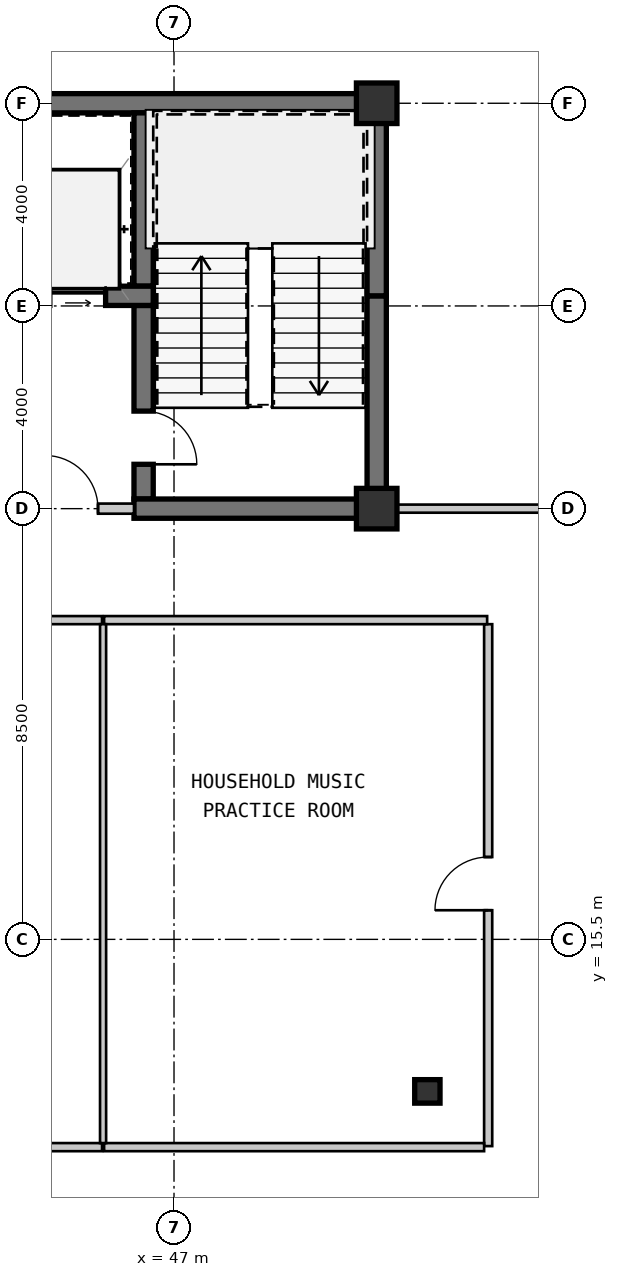
"""IFC4 building model, lengths in metres.
Left out: names, types, materials, properties, quantities, classifications, styles, units other than length and angle.
Written with IfcOpenShell. Run it as: python <this file> out.ifc"""

import sys

from ifc_helpers import new_model, si_unit, direction, frame, frame_2d, origin, origin_2d, place, context, subcontext, project, spatial, rectangle, i_section, extrude, source, transform, mapped, element, fill, save


model = new_model("IFC4")
c1 = context("Model", 3, precision=1e-05, world=origin(), true_north=direction((0.0, 1.0)))
c2 = subcontext(c1, "Body", "Model", "MODEL_VIEW")
j1 = project(units=[si_unit("LENGTHUNIT", "METRE"), si_unit("PLANEANGLEUNIT", "RADIAN")], contexts=[c1])
p1 = place(None, origin())
s1 = spatial("IfcSite", under=j1, at=p1, CompositionType="ELEMENT")
p2 = place(p1, origin())
s2 = spatial("IfcBuilding", under=s1, at=p2, CompositionType="ELEMENT")
p3 = place(p2, frame((0.0, 0.0, 51.45)))
s3 = spatial("IfcBuildingStorey", under=s2, at=p3, CompositionType="ELEMENT", Elevation=51.45)
m1 = source(origin(), c2, "Body", "SweptSolid", [
    extrude(rectangle(XDim=0.8, YDim=0.8, at=origin_2d()), origin(), (0.0, 0.0, 1.0), 3.15),
])
for number, where, z_axis, x_axis in (
    (1, (51.0, 24.0, 0.0), (0.0, 0.0, 1.0), (1.0, 0.0, 0.0)),
    (2, (51.0, 32.0, 0.0), (0.0, 0.0, 1.0), (1.0, 0.0, 0.0)),
):
    element("IfcColumn", number, at=place(p3, frame(where, z_axis=z_axis, x_axis=x_axis)), inside=s3, PredefinedType="COLUMN", context=c2, shape_type="MappedRepresentation", body=[
        mapped(m1, transform((0.0, 0.0, 0.0), scale=1.0)),
    ])
m2 = source(origin(), c2, "Body", "SweptSolid", [
    extrude(i_section(OverallWidth=0.5, OverallDepth=0.464, WebThickness=0.022, FlangeThickness=0.034, at=origin_2d()), origin(), (0.0, 0.0, 1.0), 3.15),
])
p4 = place(p3, frame((52.0, 12.5, 0.0), z_axis=(0.0, 0.0, 1.0), x_axis=(1.0, 0.0, 0.0)))
e3 = element("IfcColumn", 3, at=p4, inside=s3, PredefinedType="COLUMN", context=c2, shape_type="MappedRepresentation", body=[
    mapped(m2, transform((0.0, 0.0, 0.0), scale=1.0)),
])
m3 = source(origin(), c2, "Body", "SweptSolid", [
    extrude(rectangle(XDim=11.99, YDim=0.38, at=frame_2d((5.995, 0.0))), origin(), (0.0, 0.0, 1.0), 2.93),
])
p5 = place(p3, frame((39.2, 32.0, 0.0), z_axis=(0.0, 0.0, 1.0), x_axis=(1.0, 0.0, 0.0)))
e4 = element("IfcWall", 4, at=p5, inside=s3, PredefinedType="SHEAR", context=c2, shape_type="MappedRepresentation", body=[
    mapped(m3, transform((0.0, 0.0, 0.0), scale=1.0)),
])
m4 = source(origin(), c2, "Body", "SweptSolid", [
    extrude(rectangle(XDim=4.01, YDim=0.38, at=frame_2d((2.005, 0.0))), origin(), (0.0, 0.0, 1.0), 2.93),
])
p6 = place(p3, frame((51.0, 24.19, 0.0), z_axis=(0.0, 0.0, 1.0), x_axis=(0.0, 1.0, 0.0)))
e5 = element("IfcWall", 5, at=p6, inside=s3, PredefinedType="SHEAR", context=c2, shape_type="MappedRepresentation", body=[
    mapped(m4, transform((0.0, 0.0, 0.0), scale=1.0)),
])
m5 = source(origin(), c2, "Body", "SweptSolid", [
    extrude(rectangle(XDim=3.61, YDim=0.38, at=frame_2d((1.805, 0.0))), origin(), (0.0, 0.0, 1.0), 2.93),
])
p7 = place(p3, frame((51.0, 28.2, 0.0), z_axis=(0.0, 0.0, 1.0), x_axis=(0.0, 1.0, 0.0)))
e6 = element("IfcWall", 6, at=p7, inside=s3, PredefinedType="SHEAR", context=c2, shape_type="MappedRepresentation", body=[
    mapped(m5, transform((0.0, 0.0, 0.0), scale=1.0)),
])
m6 = source(origin(), c2, "Body", "SweptSolid", [
    extrude(rectangle(XDim=3.42, YDim=0.38, at=frame_2d((1.71, 0.0))), origin(), (0.0, 0.0, 1.0), 2.93),
])
p8 = place(p3, frame((46.4, 31.81, 0.0), z_axis=(0.0, 0.0, 1.0), x_axis=(0.0, -1.0, 0.0)))
e7 = element("IfcWall", 7, at=p8, inside=s3, PredefinedType="SHEAR", context=c2, shape_type="MappedRepresentation", body=[
    mapped(m6, transform((0.0, 0.0, 0.0), scale=1.0)),
])
m7 = source(origin(), c2, "Body", "SweptSolid", [
    extrude(rectangle(XDim=3.82, YDim=0.38, at=frame_2d((1.91, 0.0))), origin(), (0.0, 0.0, 1.0), 2.93),
])
p9 = place(p3, frame((46.4, 28.01, 0.0), z_axis=(0.0, 0.0, 1.0), x_axis=(0.0, -1.0, 0.0)))
e8 = element("IfcWall", 8, at=p9, inside=s3, PredefinedType="SHEAR", context=c2, shape_type="MappedRepresentation", body=[
    mapped(m7, transform((0.0, 0.0, 0.0), scale=1.0)),
])
m8 = source(origin(), c2, "Body", "SweptSolid", [
    extrude(rectangle(XDim=1.05, YDim=2.1, at=frame_2d((0.525, 1.05))), frame((0.0, 0.2, 0.0), z_axis=(0.0, -1.0, 0.0), x_axis=(1.0, 0.0, 0.0)), (0.0, 0.0, 1.0), 0.4),
])
p10 = place(p9, frame((2.085, 0.0, 0.0)))
e9 = element("IfcOpeningElement", 9, at=p10, cuts=e8, PredefinedType="OPENING", context=c2, shape_type="MappedRepresentation", body=[
    mapped(m8, transform((0.0, 0.0, 0.0), scale=1.0)),
])
m9 = source(origin(), c2, "Body", "SweptSolid", [
    extrude(rectangle(XDim=4.98, YDim=0.38, at=frame_2d((2.49, 0.0))), origin(), (0.0, 0.0, 1.0), 2.93),
])
p11 = place(p3, frame((46.21, 24.0, 0.0), z_axis=(0.0, 0.0, 1.0), x_axis=(1.0, 0.0, 0.0)))
e10 = element("IfcWall", 10, at=p11, inside=s3, PredefinedType="SHEAR", context=c2, shape_type="MappedRepresentation", body=[
    mapped(m9, transform((0.0, 0.0, 0.0), scale=1.0)),
])
m10 = source(origin(), c2, "Body", "SweptSolid", [
    extrude(rectangle(XDim=2.98, YDim=0.38, at=frame_2d((1.49, 0.0))), origin(), (0.0, 0.0, 1.0), 2.93),
])
p12 = place(p3, frame((43.61, 28.2, 0.0), z_axis=(0.0, 0.0, 1.0), x_axis=(1.0, 0.0, 0.0)))
e11 = element("IfcWall", 11, at=p12, inside=s3, PredefinedType="SHEAR", context=c2, shape_type="MappedRepresentation", body=[
    mapped(m10, transform((0.0, 0.0, 0.0), scale=1.0)),
])
m11 = source(origin(), c2, "Body", "SweptSolid", [
    extrude(rectangle(XDim=1.1, YDim=2.15, at=frame_2d((0.55, 1.075))), frame((0.0, 0.2, 0.0), z_axis=(0.0, -1.0, 0.0), x_axis=(1.0, 0.0, 0.0)), (0.0, 0.0, 1.0), 0.4),
])
p13 = place(p12, frame((0.94, 0.0, 0.0)))
e12 = element("IfcOpeningElement", 12, at=p13, cuts=e11, PredefinedType="OPENING", context=c2, shape_type="MappedRepresentation", body=[
    mapped(m11, transform((0.0, 0.0, 0.0), scale=1.0)),
])
m12 = source(origin(), c2, "Body", "SweptSolid", [
    extrude(rectangle(XDim=2.66, YDim=0.2, at=frame_2d((1.33, 0.0))), origin(), (0.0, 0.0, 1.0), 2.397),
])
p14 = place(p3, frame((43.55, 24.0, 0.0), z_axis=(0.0, 0.0, 1.0), x_axis=(1.0, 0.0, 0.0)))
e13 = element("IfcWall", 13, at=p14, inside=s3, PredefinedType="SOLIDWALL", context=c2, shape_type="MappedRepresentation", body=[
    mapped(m12, transform((0.0, 0.0, 0.0), scale=1.0)),
])
m13 = source(origin(), c2, "Body", "SweptSolid", [
    extrude(rectangle(XDim=1.05, YDim=2.1, at=frame_2d((0.525, 1.05))), frame((0.0, 0.11, 0.0), z_axis=(0.0, -1.0, 0.0), x_axis=(1.0, 0.0, 0.0)), (0.0, 0.0, 1.0), 0.22),
])
p15 = place(p14, frame((0.9, 0.0, 0.0)))
e14 = element("IfcOpeningElement", 14, at=p15, cuts=e13, PredefinedType="OPENING", context=c2, shape_type="MappedRepresentation", body=[
    mapped(m13, transform((0.0, 0.0, 0.0), scale=1.0)),
])
m14 = source(origin(), c2, "Body", "SweptSolid", [
    extrude(rectangle(XDim=7.56, YDim=0.16, at=frame_2d((3.78, 0.0))), origin(), (0.0, 0.0, 1.0), 2.93),
])
p16 = place(p3, frame((45.58, 21.8, 0.0), z_axis=(0.0, 0.0, 1.0), x_axis=(-1.0, 0.0, 0.0)))
e15 = element("IfcWall", 15, at=p16, inside=s3, PredefinedType="PARTITIONING", context=c2, shape_type="MappedRepresentation", body=[
    mapped(m14, transform((0.0, 0.0, 0.0), scale=1.0)),
])
m15 = source(origin(), c2, "Body", "SweptSolid", [
    extrude(rectangle(XDim=1.05, YDim=2.1, at=frame_2d((0.525, 1.05))), frame((0.0, 0.09, 0.0), z_axis=(0.0, -1.0, 0.0), x_axis=(1.0, 0.0, 0.0)), (0.0, 0.0, 1.0), 0.18),
])
p17 = place(p16, frame((3.255, 0.0, 0.0)))
e16 = element("IfcOpeningElement", 16, at=p17, cuts=e15, PredefinedType="OPENING", context=c2, shape_type="MappedRepresentation", body=[
    mapped(m15, transform((0.0, 0.0, 0.0), scale=1.0)),
])
m16 = source(origin(), c2, "Body", "SweptSolid", [
    extrude(rectangle(XDim=10.3, YDim=0.16, at=frame_2d((5.15, 0.0))), origin(), (0.0, 0.0, 1.0), 2.93),
])
p18 = place(p3, frame((53.2, 11.42, 0.0), z_axis=(0.0, 0.0, 1.0), x_axis=(0.0, 1.0, 0.0)))
e17 = element("IfcWall", 17, at=p18, inside=s3, PredefinedType="PARTITIONING", context=c2, shape_type="MappedRepresentation", body=[
    mapped(m16, transform((0.0, 0.0, 0.0), scale=1.0)),
])
p19 = place(p18, frame((4.655, 0.0, 0.0)))
e18 = element("IfcOpeningElement", 18, at=p19, cuts=e17, PredefinedType="OPENING", context=c2, shape_type="MappedRepresentation", body=[
    mapped(m15, transform((0.0, 0.0, 0.0), scale=1.0)),
])
p20 = place(p3, frame((53.18, 21.8, 0.0), z_axis=(0.0, 0.0, 1.0), x_axis=(-1.0, 0.0, 0.0)))
e19 = element("IfcWall", 19, at=p20, inside=s3, PredefinedType="PARTITIONING", context=c2, shape_type="MappedRepresentation", body=[
    mapped(m14, transform((0.0, 0.0, 0.0), scale=1.0)),
])
m17 = source(origin(), c2, "Body", "SweptSolid", [
    extrude(rectangle(XDim=4.13, YDim=0.16, at=frame_2d((2.065, 0.0))), origin(), (0.0, 0.0, 1.0), 2.93),
])
p21 = place(p3, frame((51.19, 24.0, 0.0), z_axis=(0.0, 0.0, 1.0), x_axis=(1.0, 0.0, 0.0)))
e20 = element("IfcWall", 20, at=p21, inside=s3, PredefinedType="PARTITIONING", context=c2, shape_type="MappedRepresentation", body=[
    mapped(m17, transform((0.0, 0.0, 0.0), scale=1.0)),
])
p22 = place(p3, frame((38.02, 11.4, 0.0), z_axis=(0.0, 0.0, 1.0), x_axis=(1.0, 0.0, 0.0)))
e21 = element("IfcWall", 21, at=p22, inside=s3, PredefinedType="PARTITIONING", context=c2, shape_type="MappedRepresentation", body=[
    mapped(m14, transform((0.0, 0.0, 0.0), scale=1.0)),
])
m18 = source(origin(), c2, "Body", "SweptSolid", [
    extrude(rectangle(XDim=7.5, YDim=0.16, at=frame_2d((3.75, 0.0))), origin(), (0.0, 0.0, 1.0), 2.93),
])
p23 = place(p3, frame((45.62, 11.4, 0.0), z_axis=(0.0, 0.0, 1.0), x_axis=(1.0, 0.0, 0.0)))
e22 = element("IfcWall", 22, at=p23, inside=s3, PredefinedType="PARTITIONING", context=c2, shape_type="MappedRepresentation", body=[
    mapped(m18, transform((0.0, 0.0, 0.0), scale=1.0)),
])
m19 = source(origin(), c2, "Body", "SweptSolid", [
    extrude(rectangle(XDim=10.24, YDim=0.12, at=frame_2d((5.12, 0.0))), origin(), (0.0, 0.0, 1.0), 2.93),
])
p24 = place(p3, frame((45.6, 21.72, 0.0), z_axis=(0.0, 0.0, 1.0), x_axis=(0.0, -1.0, 0.0)))
e23 = element("IfcWall", 23, at=p24, inside=s3, PredefinedType="PARTITIONING", context=c2, shape_type="MappedRepresentation", body=[
    mapped(m19, transform((0.0, 0.0, 0.0), scale=1.0)),
])
m20 = source(origin(), c2, "Body", "SweptSolid", [
    extrude(rectangle(XDim=1.05, YDim=2.1, at=frame_2d((0.525, 1.05))), frame((0.0, 0.025, 0.0), z_axis=(0.0, -1.0, 0.0), x_axis=(1.0, 0.0, 0.0)), (0.0, 0.0, 1.0), 0.05),
])
p25 = place(p10, origin())
e24 = element("IfcDoor", 24, at=p25, inside=s3, OperationType="SINGLE_SWING_RIGHT", PredefinedType="DOOR", context=c2, shape_type="MappedRepresentation", body=[
    mapped(m20, transform((0.0, 0.0, 0.0), scale=1.0)),
])
fill(e9, e24)
m21 = source(origin(), c2, "Body", "SweptSolid", [
    extrude(rectangle(XDim=1.1, YDim=2.15, at=frame_2d((0.55, 1.075))), frame((0.0, 0.025, 0.0), z_axis=(0.0, -1.0, 0.0), x_axis=(1.0, 0.0, 0.0)), (0.0, 0.0, 1.0), 0.05),
])
p26 = place(p13, origin())
e25 = element("IfcDoor", 25, at=p26, inside=s3, OperationType="SLIDING_TO_LEFT", PredefinedType="DOOR", context=c2, shape_type="MappedRepresentation", body=[
    mapped(m21, transform((0.0, 0.0, 0.0), scale=1.0)),
])
fill(e12, e25)
p27 = place(p15, origin())
e26 = element("IfcDoor", 26, at=p27, inside=s3, OperationType="SINGLE_SWING_LEFT", PredefinedType="DOOR", context=c2, shape_type="MappedRepresentation", body=[
    mapped(m20, transform((0.0, 0.0, 0.0), scale=1.0)),
])
fill(e14, e26)
p28 = place(p19, origin())
e27 = element("IfcDoor", 27, at=p28, inside=s3, OperationType="SINGLE_SWING_LEFT", PredefinedType="DOOR", context=c2, shape_type="MappedRepresentation", body=[
    mapped(m20, transform((0.0, 0.0, 0.0), scale=1.0)),
])
fill(e18, e27)
save(model, sys.argv[1])
